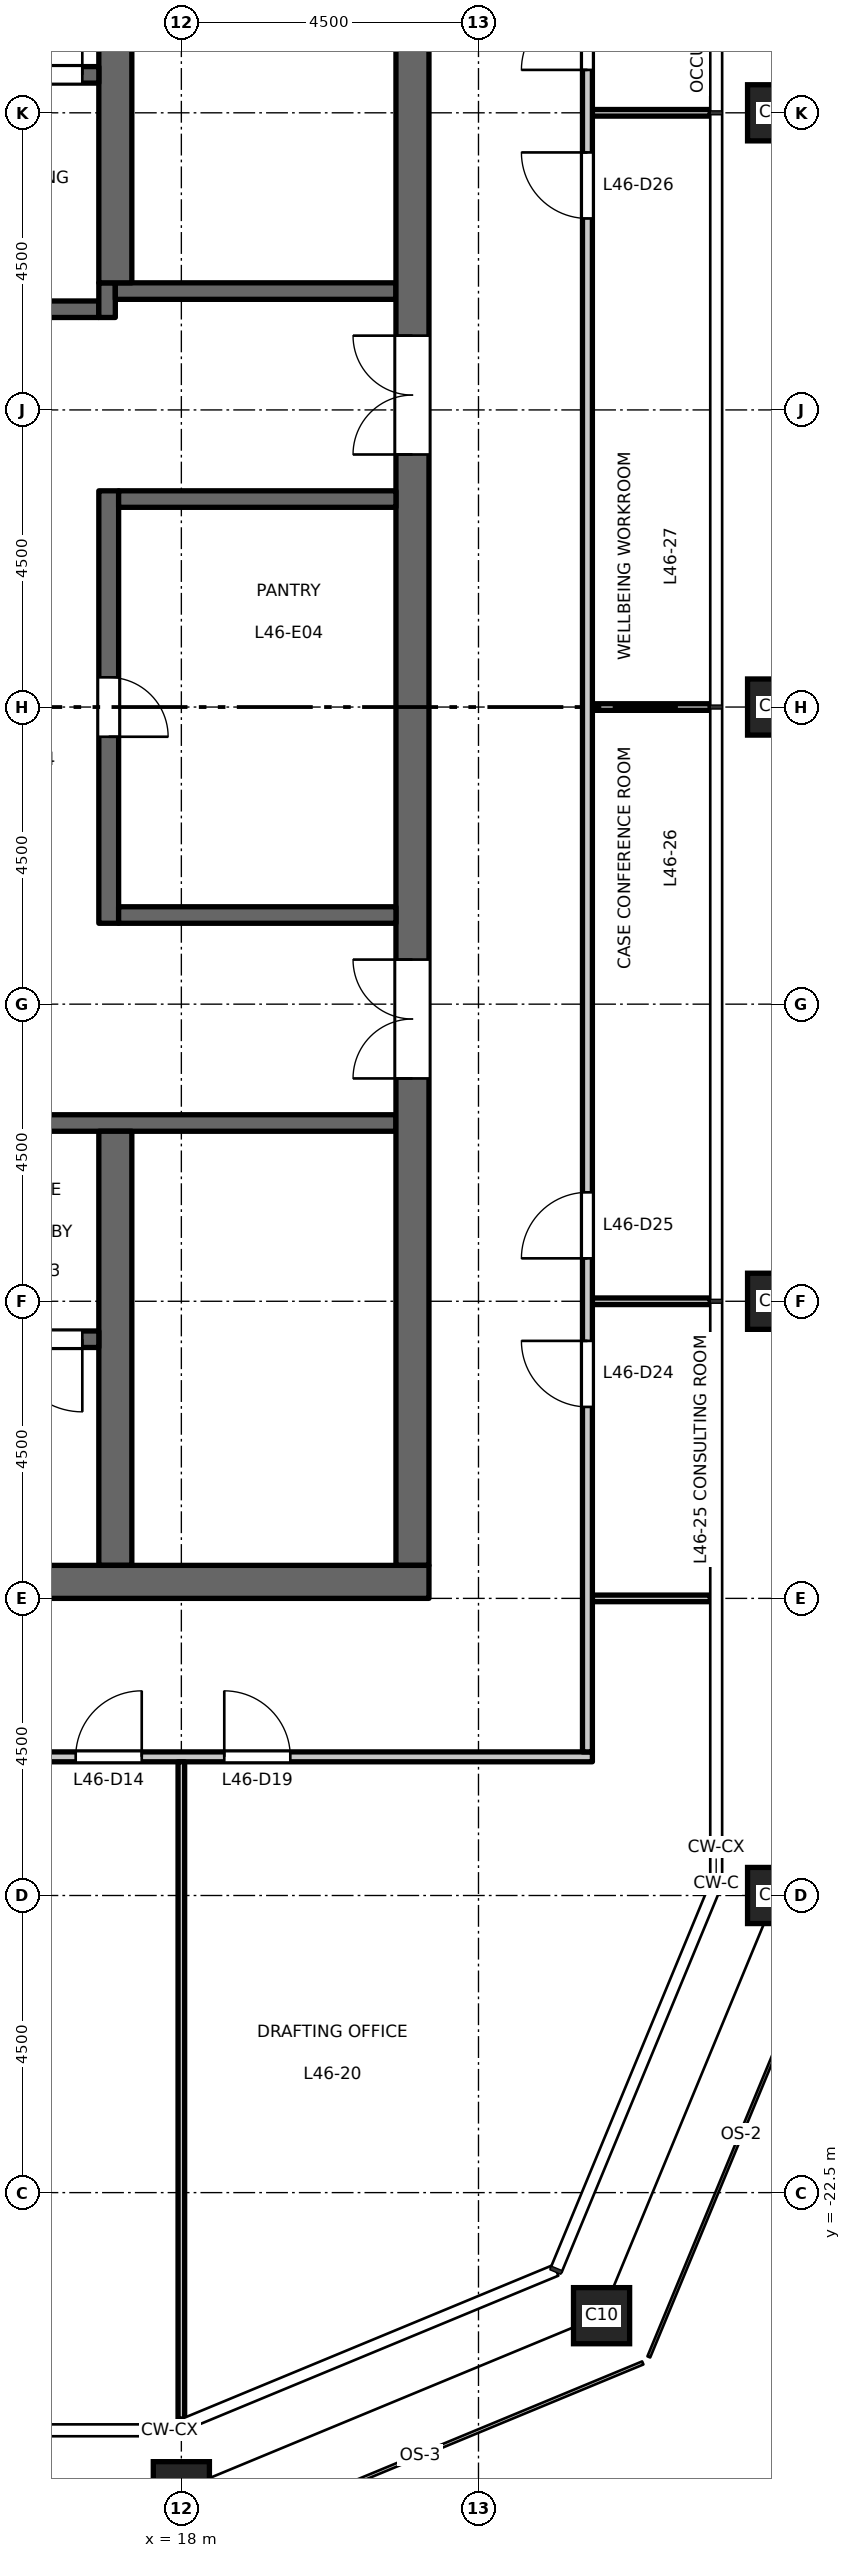
"""IFC4 building model, lengths in metres.
Left out: names, types, materials, properties, quantities, classifications, styles, units other than length and angle.
Written with IfcOpenShell. Run it as: python <this file> out.ifc"""

import sys

from ifc_helpers import new_model, si_unit, direction, frame, frame_2d, origin, origin_2d, place, context, subcontext, project, spatial, rectangle, hollow_rectangle, extrude, element, fill, save


model = new_model("IFC4")
c1 = context("Model", 3, precision=1e-05, world=origin(), true_north=direction((0.0, 1.0)))
c2 = subcontext(c1, "Body", "Model", "MODEL_VIEW")
j1 = project(units=[si_unit("LENGTHUNIT", "METRE"), si_unit("PLANEANGLEUNIT", "RADIAN")], contexts=[c1])
p1 = place(None, origin())
s1 = spatial("IfcSite", under=j1, at=p1, CompositionType="ELEMENT")
p2 = place(p1, origin())
s2 = spatial("IfcBuilding", under=s1, at=p2, CompositionType="ELEMENT")
p3 = place(p2, frame((0.0, 0.0, 215.2)))
s3 = spatial("IfcBuildingStorey", under=s2, at=p3, CompositionType="ELEMENT", Elevation=215.2)
for number, where, z_axis, x_axis in (
    (1, (18.0, -27.0, 0.0), (0.0, 0.0, 1.0), (1.0, 0.0, 0.0)),
    (2, (24.364, -24.364, 0.0), (0.0, 0.0, 1.0), (1.0, 0.0, 0.0)),
    (3, (27.0, -18.0, 0.0), (0.0, 0.0, 1.0), (1.0, 0.0, 0.0)),
    (4, (27.0, -9.0, 0.0), (0.0, 0.0, 1.0), (1.0, 0.0, 0.0)),
    (5, (27.0, 0.0, 0.0), (0.0, 0.0, 1.0), (1.0, 0.0, 0.0)),
    (6, (27.0, 9.0, 0.0), (0.0, 0.0, 1.0), (1.0, 0.0, 0.0)),
):
    element("IfcColumn", number, at=place(p3, frame(where, z_axis=z_axis, x_axis=x_axis)), inside=s3, PredefinedType="COLUMN", context=c2, shape_type="SweptSolid", body=[
        extrude(hollow_rectangle(XDim=0.85, YDim=0.85, WallThickness=0.05, at=origin_2d()), origin(), (0.0, 0.0, 1.0), 4.5),
    ])
p4 = place(p3, frame((12.15, 6.025, 0.0), z_axis=(0.0, 0.0, 1.0), x_axis=(1.0, 0.0, 0.0)))
e7 = element("IfcWall", 7, at=p4, inside=s3, PredefinedType="SHEAR", context=c2, shape_type="SweptSolid", body=[
    extrude(rectangle(XDim=4.6, YDim=0.25, at=frame_2d((2.3, 0.0))), origin(), (0.0, 0.0, 1.0), 4.35),
])
p5 = place(p4, frame((1.8, 0.0, 0.0)))
e8 = element("IfcOpeningElement", 8, at=p5, cuts=e7, PredefinedType="OPENING", context=c2, shape_type="SweptSolid", body=[
    extrude(rectangle(XDim=1.0, YDim=2.1, at=frame_2d((0.5, 1.05))), frame((0.0, 0.135, 0.0), z_axis=(0.0, -1.0, 0.0), x_axis=(1.0, 0.0, 0.0)), (0.0, 0.0, 1.0), 0.27),
])
p6 = place(p3, frame((16.875, 5.9, 0.0), z_axis=(0.0, 0.0, 1.0), x_axis=(0.0, 1.0, 0.0)))
e9 = element("IfcWall", 9, at=p6, inside=s3, PredefinedType="SHEAR", context=c2, shape_type="SweptSolid", body=[
    extrude(rectangle(XDim=0.525, YDim=0.25, at=frame_2d((0.263, 0.0))), origin(), (0.0, 0.0, 1.0), 4.35),
])
p7 = place(p3, frame((17.0, 6.3, 0.0), z_axis=(0.0, 0.0, 1.0), x_axis=(1.0, 0.0, 0.0)))
e10 = element("IfcWall", 10, at=p7, inside=s3, PredefinedType="SHEAR", context=c2, shape_type="SweptSolid", body=[
    extrude(rectangle(XDim=4.25, YDim=0.25, at=frame_2d((2.125, 0.0))), origin(), (0.0, 0.0, 1.0), 4.35),
])
p8 = place(p3, frame((12.15, -6.3, 0.0), z_axis=(0.0, 0.0, 1.0), x_axis=(1.0, 0.0, 0.0)))
e11 = element("IfcWall", 11, at=p8, inside=s3, PredefinedType="SHEAR", context=c2, shape_type="SweptSolid", body=[
    extrude(rectangle(XDim=9.1, YDim=0.25, at=frame_2d((4.55, 0.0))), origin(), (0.0, 0.0, 1.0), 4.35),
])
p9 = place(p8, frame((1.8, 0.0, 0.0)))
e12 = element("IfcOpeningElement", 12, at=p9, cuts=e11, PredefinedType="OPENING", context=c2, shape_type="SweptSolid", body=[
    extrude(rectangle(XDim=1.0, YDim=2.1, at=frame_2d((0.5, 1.05))), frame((0.0, 0.135, 0.0), z_axis=(0.0, -1.0, 0.0), x_axis=(1.0, 0.0, 0.0)), (0.0, 0.0, 1.0), 0.27),
])
p10 = place(p3, frame((21.5, -13.0, 0.0), z_axis=(0.0, 0.0, 1.0), x_axis=(0.0, 1.0, 0.0)))
e13 = element("IfcWall", 13, at=p10, inside=s3, PredefinedType="SHEAR", context=c2, shape_type="SweptSolid", body=[
    extrude(rectangle(XDim=26.0, YDim=0.5, at=frame_2d((13.0, 0.0))), origin(), (0.0, 0.0, 1.0), 4.35),
])
p11 = place(p10, frame((16.825, 0.0, 0.0)))
e14 = element("IfcOpeningElement", 14, at=p11, cuts=e13, PredefinedType="OPENING", context=c2, shape_type="SweptSolid", body=[
    extrude(rectangle(XDim=1.8, YDim=2.1, at=frame_2d((0.9, 1.05))), frame((0.0, 0.26, 0.0), z_axis=(0.0, -1.0, 0.0), x_axis=(1.0, 0.0, 0.0)), (0.0, 0.0, 1.0), 0.52),
])
p12 = place(p10, frame((7.375, 0.0, 0.0)))
e15 = element("IfcOpeningElement", 15, at=p12, cuts=e13, PredefinedType="OPENING", context=c2, shape_type="SweptSolid", body=[
    extrude(rectangle(XDim=1.8, YDim=2.1, at=frame_2d((0.9, 1.05))), frame((0.0, 0.26, 0.0), z_axis=(0.0, -1.0, 0.0), x_axis=(1.0, 0.0, 0.0)), (0.0, 0.0, 1.0), 0.52),
])
p13 = place(p3, frame((16.9, -3.275, 0.0), z_axis=(0.0, 0.0, 1.0), x_axis=(0.0, 1.0, 0.0)))
e16 = element("IfcWall", 16, at=p13, inside=s3, PredefinedType="SHEAR", context=c2, shape_type="SweptSolid", body=[
    extrude(rectangle(XDim=6.55, YDim=0.3, at=frame_2d((3.275, 0.0))), origin(), (0.0, 0.0, 1.0), 4.35),
])
p14 = place(p13, frame((2.825, 0.0, 0.0)))
e17 = element("IfcOpeningElement", 17, at=p14, cuts=e16, PredefinedType="OPENING", context=c2, shape_type="SweptSolid", body=[
    extrude(rectangle(XDim=0.9, YDim=2.1, at=frame_2d((0.45, 1.05))), frame((0.0, 0.16, 0.0), z_axis=(0.0, -1.0, 0.0), x_axis=(1.0, 0.0, 0.0)), (0.0, 0.0, 1.0), 0.32),
])
for number, where, z_axis, x_axis in (
    (18, (17.05, 3.15, 0.0), (0.0, 0.0, 1.0), (1.0, 0.0, 0.0)),
    (19, (17.05, -3.15, 0.0), (0.0, 0.0, 1.0), (1.0, 0.0, 0.0)),
):
    element("IfcWall", number, at=place(p3, frame(where, z_axis=z_axis, x_axis=x_axis)), inside=s3, PredefinedType="SHEAR", context=c2, shape_type="SweptSolid", body=[
        extrude(rectangle(XDim=4.2, YDim=0.25, at=frame_2d((2.1, 0.0))), origin(), (0.0, 0.0, 1.0), 4.35),
    ])
for number, where, z_axis, x_axis in (
    (20, (17.0, 6.425, 0.0), (0.0, 0.0, 1.0), (0.0, 1.0, 0.0)),
    (21, (17.0, -13.0, 0.0), (0.0, 0.0, 1.0), (0.0, 1.0, 0.0)),
):
    element("IfcWall", number, at=place(p3, frame(where, z_axis=z_axis, x_axis=x_axis)), inside=s3, PredefinedType="SHEAR", context=c2, shape_type="SweptSolid", body=[
        extrude(rectangle(XDim=6.575, YDim=0.5, at=frame_2d((3.288, 0.0))), origin(), (0.0, 0.0, 1.0), 4.35),
    ])
p15 = place(p3, frame((8.75, 9.575, 0.0), z_axis=(0.0, 0.0, 1.0), x_axis=(1.0, 0.0, 0.0)))
e22 = element("IfcWall", 22, at=p15, inside=s3, PredefinedType="SHEAR", context=c2, shape_type="SweptSolid", body=[
    extrude(rectangle(XDim=8.0, YDim=0.25, at=frame_2d((4.0, 0.0))), origin(), (0.0, 0.0, 1.0), 4.35),
])
p16 = place(p15, frame((6.65, 0.0, 0.0)))
e23 = element("IfcOpeningElement", 23, at=p16, cuts=e22, PredefinedType="OPENING", context=c2, shape_type="SweptSolid", body=[
    extrude(rectangle(XDim=1.1, YDim=2.1, at=frame_2d((0.55, 1.05))), frame((0.0, 0.135, 0.0), z_axis=(0.0, -1.0, 0.0), x_axis=(1.0, 0.0, 0.0)), (0.0, 0.0, 1.0), 0.27),
])
p17 = place(p3, frame((8.75, -9.575, 0.0), z_axis=(0.0, 0.0, 1.0), x_axis=(1.0, 0.0, 0.0)))
e24 = element("IfcWall", 24, at=p17, inside=s3, PredefinedType="SHEAR", context=c2, shape_type="SweptSolid", body=[
    extrude(rectangle(XDim=8.0, YDim=0.25, at=frame_2d((4.0, 0.0))), origin(), (0.0, 0.0, 1.0), 4.35),
])
p18 = place(p17, frame((6.65, 0.0, 0.0)))
e25 = element("IfcOpeningElement", 25, at=p18, cuts=e24, PredefinedType="OPENING", context=c2, shape_type="SweptSolid", body=[
    extrude(rectangle(XDim=1.1, YDim=2.1, at=frame_2d((0.55, 1.05))), frame((0.0, 0.135, 0.0), z_axis=(0.0, -1.0, 0.0), x_axis=(1.0, 0.0, 0.0)), (0.0, 0.0, 1.0), 0.27),
])
p19 = place(p3, frame((8.25, -13.25, 0.0), z_axis=(0.0, 0.0, 1.0), x_axis=(1.0, 0.0, 0.0)))
e26 = element("IfcWall", 26, at=p19, inside=s3, PredefinedType="SHEAR", context=c2, shape_type="SweptSolid", body=[
    extrude(rectangle(XDim=13.5, YDim=0.5, at=frame_2d((6.75, 0.0))), origin(), (0.0, 0.0, 1.0), 4.35),
])
p20 = place(p3, frame((-24.225, -15.9, 0.0), z_axis=(0.0, 0.0, 1.0), x_axis=(1.0, 0.0, 0.0)))
e27 = element("IfcWall", 27, at=p20, inside=s3, PredefinedType="PARTITIONING", context=c2, shape_type="SweptSolid", body=[
    extrude(rectangle(XDim=48.45, YDim=0.15, at=frame_2d((24.225, 0.0))), origin(), (0.0, 0.0, 1.0), 4.35),
])
p21 = place(p20, frame((6.875, 0.0, 0.0)))
e28 = element("IfcOpeningElement", 28, at=p21, cuts=e27, PredefinedType="OPENING", context=c2, shape_type="SweptSolid", body=[
    extrude(rectangle(XDim=1.0, YDim=2.1, at=frame_2d((0.5, 1.05))), frame((0.0, 0.085, 0.0), z_axis=(0.0, -1.0, 0.0), x_axis=(1.0, 0.0, 0.0)), (0.0, 0.0, 1.0), 0.17),
])
p22 = place(p20, frame((15.875, 0.0, 0.0)))
e29 = element("IfcOpeningElement", 29, at=p22, cuts=e27, PredefinedType="OPENING", context=c2, shape_type="SweptSolid", body=[
    extrude(rectangle(XDim=1.0, YDim=2.1, at=frame_2d((0.5, 1.05))), frame((0.0, 0.085, 0.0), z_axis=(0.0, -1.0, 0.0), x_axis=(1.0, 0.0, 0.0)), (0.0, 0.0, 1.0), 0.17),
])
p23 = place(p20, frame((24.875, 0.0, 0.0)))
e30 = element("IfcOpeningElement", 30, at=p23, cuts=e27, PredefinedType="OPENING", context=c2, shape_type="SweptSolid", body=[
    extrude(rectangle(XDim=1.0, YDim=2.1, at=frame_2d((0.5, 1.05))), frame((0.0, 0.085, 0.0), z_axis=(0.0, -1.0, 0.0), x_axis=(1.0, 0.0, 0.0)), (0.0, 0.0, 1.0), 0.17),
])
p24 = place(p20, frame((40.625, 0.0, 0.0)))
e31 = element("IfcOpeningElement", 31, at=p24, cuts=e27, PredefinedType="OPENING", context=c2, shape_type="SweptSolid", body=[
    extrude(rectangle(XDim=1.0, YDim=2.1, at=frame_2d((0.5, 1.05))), frame((0.0, 0.085, 0.0), z_axis=(0.0, -1.0, 0.0), x_axis=(1.0, 0.0, 0.0)), (0.0, 0.0, 1.0), 0.17),
])
p25 = place(p20, frame((4.725, 0.0, 0.0)))
e32 = element("IfcOpeningElement", 32, at=p25, cuts=e27, PredefinedType="OPENING", context=c2, shape_type="SweptSolid", body=[
    extrude(rectangle(XDim=1.0, YDim=2.1, at=frame_2d((0.5, 1.05))), frame((0.0, 0.085, 0.0), z_axis=(0.0, -1.0, 0.0), x_axis=(1.0, 0.0, 0.0)), (0.0, 0.0, 1.0), 0.17),
])
p26 = place(p20, frame((42.875, 0.0, 0.0)))
e33 = element("IfcOpeningElement", 33, at=p26, cuts=e27, PredefinedType="OPENING", context=c2, shape_type="SweptSolid", body=[
    extrude(rectangle(XDim=1.0, YDim=2.1, at=frame_2d((0.5, 1.05))), frame((0.0, 0.085, 0.0), z_axis=(0.0, -1.0, 0.0), x_axis=(1.0, 0.0, 0.0)), (0.0, 0.0, 1.0), 0.17),
])
p27 = place(p3, frame((24.225, -13.5, 0.0), z_axis=(0.0, 0.0, 1.0), x_axis=(1.0, 0.0, 0.0)))
e34 = element("IfcWall", 34, at=p27, inside=s3, PredefinedType="PARTITIONING", context=c2, shape_type="SweptSolid", body=[
    extrude(rectangle(XDim=1.785, YDim=0.1, at=frame_2d((0.893, 0.0))), origin(), (0.0, 0.0, 1.0), 3.95),
])
for number, where, z_axis, x_axis in (
    (35, (24.225, -9.0, 0.0), (0.0, 0.0, 1.0), (1.0, 0.0, 0.0)),
    (36, (24.225, 0.0, 0.0), (0.0, 0.0, 1.0), (1.0, 0.0, 0.0)),
    (37, (24.225, 9.0, 0.0), (0.0, 0.0, 1.0), (1.0, 0.0, 0.0)),
):
    element("IfcWall", number, at=place(p3, frame(where, z_axis=z_axis, x_axis=x_axis)), inside=s3, PredefinedType="PARTITIONING", context=c2, shape_type="SweptSolid", body=[
        extrude(rectangle(XDim=1.785, YDim=0.1, at=frame_2d((0.893, 0.0))), origin(), (0.0, 0.0, 1.0), 4.35),
    ])
p28 = place(p3, frame((18.0, -25.928, 0.0), z_axis=(0.0, 0.0, 1.0), x_axis=(0.0, 1.0, 0.0)))
e38 = element("IfcWall", 38, at=p28, inside=s3, PredefinedType="PARTITIONING", context=c2, shape_type="SweptSolid", body=[
    extrude(rectangle(XDim=9.953, YDim=0.1, at=frame_2d((4.977, 0.0))), origin(), (0.0, 0.0, 1.0), 3.65),
])
p29 = place(p3, frame((24.15, -15.825, 0.0), z_axis=(0.0, 0.0, 1.0), x_axis=(0.0, 1.0, 0.0)))
e39 = element("IfcWall", 39, at=p29, inside=s3, PredefinedType="PARTITIONING", context=c2, shape_type="SweptSolid", body=[
    extrude(rectangle(XDim=31.65, YDim=0.15, at=frame_2d((15.825, 0.0))), origin(), (0.0, 0.0, 1.0), 4.35),
])
p30 = place(p29, frame((29.975, 0.0, 0.0)))
e40 = element("IfcOpeningElement", 40, at=p30, cuts=e39, PredefinedType="OPENING", context=c2, shape_type="SweptSolid", body=[
    extrude(rectangle(XDim=1.0, YDim=2.1, at=frame_2d((0.5, 1.05))), frame((0.0, 0.085, 0.0), z_axis=(0.0, -1.0, 0.0), x_axis=(1.0, 0.0, 0.0)), (0.0, 0.0, 1.0), 0.17),
])
p31 = place(p29, frame((5.225, 0.0, 0.0)))
e41 = element("IfcOpeningElement", 41, at=p31, cuts=e39, PredefinedType="OPENING", context=c2, shape_type="SweptSolid", body=[
    extrude(rectangle(XDim=1.0, YDim=2.1, at=frame_2d((0.5, 1.05))), frame((0.0, 0.085, 0.0), z_axis=(0.0, -1.0, 0.0), x_axis=(1.0, 0.0, 0.0)), (0.0, 0.0, 1.0), 0.17),
])
p32 = place(p29, frame((7.475, 0.0, 0.0)))
e42 = element("IfcOpeningElement", 42, at=p32, cuts=e39, PredefinedType="OPENING", context=c2, shape_type="SweptSolid", body=[
    extrude(rectangle(XDim=1.0, YDim=2.1, at=frame_2d((0.5, 1.05))), frame((0.0, 0.085, 0.0), z_axis=(0.0, -1.0, 0.0), x_axis=(1.0, 0.0, 0.0)), (0.0, 0.0, 1.0), 0.17),
])
p33 = place(p29, frame((23.225, 0.0, 0.0)))
e43 = element("IfcOpeningElement", 43, at=p33, cuts=e39, PredefinedType="OPENING", context=c2, shape_type="SweptSolid", body=[
    extrude(rectangle(XDim=1.0, YDim=2.1, at=frame_2d((0.5, 1.05))), frame((0.0, 0.085, 0.0), z_axis=(0.0, -1.0, 0.0), x_axis=(1.0, 0.0, 0.0)), (0.0, 0.0, 1.0), 0.17),
])
p34 = place(p29, frame((25.475, 0.0, 0.0)))
e44 = element("IfcOpeningElement", 44, at=p34, cuts=e39, PredefinedType="OPENING", context=c2, shape_type="SweptSolid", body=[
    extrude(rectangle(XDim=1.0, YDim=2.1, at=frame_2d((0.5, 1.05))), frame((0.0, 0.085, 0.0), z_axis=(0.0, -1.0, 0.0), x_axis=(1.0, 0.0, 0.0)), (0.0, 0.0, 1.0), 0.17),
])
p35 = place(p16, origin())
e45 = element("IfcDoor", 45, at=p35, inside=s3, OperationType="SINGLE_SWING_LEFT", PredefinedType="DOOR", context=c2, shape_type="SweptSolid", body=[
    extrude(rectangle(XDim=1.1, YDim=2.1, at=frame_2d((0.55, 1.05))), frame((0.0, 0.025, 0.0), z_axis=(0.0, -1.0, 0.0), x_axis=(1.0, 0.0, 0.0)), (0.0, 0.0, 1.0), 0.05),
])
fill(e23, e45)
p36 = place(p18, origin())
e46 = element("IfcDoor", 46, at=p36, inside=s3, OperationType="SINGLE_SWING_RIGHT", PredefinedType="DOOR", context=c2, shape_type="SweptSolid", body=[
    extrude(rectangle(XDim=1.1, YDim=2.1, at=frame_2d((0.55, 1.05))), frame((0.0, 0.025, 0.0), z_axis=(0.0, -1.0, 0.0), x_axis=(1.0, 0.0, 0.0)), (0.0, 0.0, 1.0), 0.05),
])
fill(e25, e46)
p37 = place(p11, origin())
e47 = element("IfcDoor", 47, at=p37, inside=s3, OperationType="DOUBLE_DOOR_DOUBLE_SWING", PredefinedType="DOOR", context=c2, shape_type="SweptSolid", body=[
    extrude(rectangle(XDim=1.8, YDim=2.1, at=frame_2d((0.9, 1.05))), frame((0.0, 0.025, 0.0), z_axis=(0.0, -1.0, 0.0), x_axis=(1.0, 0.0, 0.0)), (0.0, 0.0, 1.0), 0.05),
])
fill(e14, e47)
p38 = place(p12, origin())
e48 = element("IfcDoor", 48, at=p38, inside=s3, OperationType="DOUBLE_DOOR_DOUBLE_SWING", PredefinedType="DOOR", context=c2, shape_type="SweptSolid", body=[
    extrude(rectangle(XDim=1.8, YDim=2.1, at=frame_2d((0.9, 1.05))), frame((0.0, 0.025, 0.0), z_axis=(0.0, -1.0, 0.0), x_axis=(1.0, 0.0, 0.0)), (0.0, 0.0, 1.0), 0.05),
])
fill(e15, e48)
p39 = place(p14, origin())
e49 = element("IfcDoor", 49, at=p39, inside=s3, OperationType="SINGLE_SWING_LEFT", PredefinedType="DOOR", context=c2, shape_type="SweptSolid", body=[
    extrude(rectangle(XDim=0.9, YDim=2.1, at=frame_2d((0.45, 1.05))), frame((0.0, 0.025, 0.0), z_axis=(0.0, -1.0, 0.0), x_axis=(1.0, 0.0, 0.0)), (0.0, 0.0, 1.0), 0.05),
])
fill(e17, e49)
p40 = place(p24, origin())
e50 = element("IfcDoor", 50, at=p40, inside=s3, OperationType="SINGLE_SWING_RIGHT", PredefinedType="DOOR", context=c2, shape_type="SweptSolid", body=[
    extrude(rectangle(XDim=1.0, YDim=2.1, at=frame_2d((0.5, 1.05))), frame((0.0, 0.025, 0.0), z_axis=(0.0, -1.0, 0.0), x_axis=(1.0, 0.0, 0.0)), (0.0, 0.0, 1.0), 0.05),
])
fill(e31, e50)
p41 = place(p26, origin())
e51 = element("IfcDoor", 51, at=p41, inside=s3, OperationType="SINGLE_SWING_LEFT", PredefinedType="DOOR", context=c2, shape_type="SweptSolid", body=[
    extrude(rectangle(XDim=1.0, YDim=2.1, at=frame_2d((0.5, 1.05))), frame((0.0, 0.025, 0.0), z_axis=(0.0, -1.0, 0.0), x_axis=(1.0, 0.0, 0.0)), (0.0, 0.0, 1.0), 0.05),
])
fill(e33, e51)
p42 = place(p31, origin())
e52 = element("IfcDoor", 52, at=p42, inside=s3, OperationType="SINGLE_SWING_RIGHT", PredefinedType="DOOR", context=c2, shape_type="SweptSolid", body=[
    extrude(rectangle(XDim=1.0, YDim=2.1, at=frame_2d((0.5, 1.05))), frame((0.0, 0.025, 0.0), z_axis=(0.0, -1.0, 0.0), x_axis=(1.0, 0.0, 0.0)), (0.0, 0.0, 1.0), 0.05),
])
fill(e41, e52)
p43 = place(p32, origin())
e53 = element("IfcDoor", 53, at=p43, inside=s3, OperationType="SINGLE_SWING_LEFT", PredefinedType="DOOR", context=c2, shape_type="SweptSolid", body=[
    extrude(rectangle(XDim=1.0, YDim=2.1, at=frame_2d((0.5, 1.05))), frame((0.0, 0.025, 0.0), z_axis=(0.0, -1.0, 0.0), x_axis=(1.0, 0.0, 0.0)), (0.0, 0.0, 1.0), 0.05),
])
fill(e42, e53)
p44 = place(p33, origin())
e54 = element("IfcDoor", 54, at=p44, inside=s3, OperationType="SINGLE_SWING_RIGHT", PredefinedType="DOOR", context=c2, shape_type="SweptSolid", body=[
    extrude(rectangle(XDim=1.0, YDim=2.1, at=frame_2d((0.5, 1.05))), frame((0.0, 0.025, 0.0), z_axis=(0.0, -1.0, 0.0), x_axis=(1.0, 0.0, 0.0)), (0.0, 0.0, 1.0), 0.05),
])
fill(e43, e54)
p45 = place(p34, origin())
e55 = element("IfcDoor", 55, at=p45, inside=s3, OperationType="SINGLE_SWING_LEFT", PredefinedType="DOOR", context=c2, shape_type="SweptSolid", body=[
    extrude(rectangle(XDim=1.0, YDim=2.1, at=frame_2d((0.5, 1.05))), frame((0.0, 0.025, 0.0), z_axis=(0.0, -1.0, 0.0), x_axis=(1.0, 0.0, 0.0)), (0.0, 0.0, 1.0), 0.05),
])
fill(e44, e55)
save(model, sys.argv[1])
